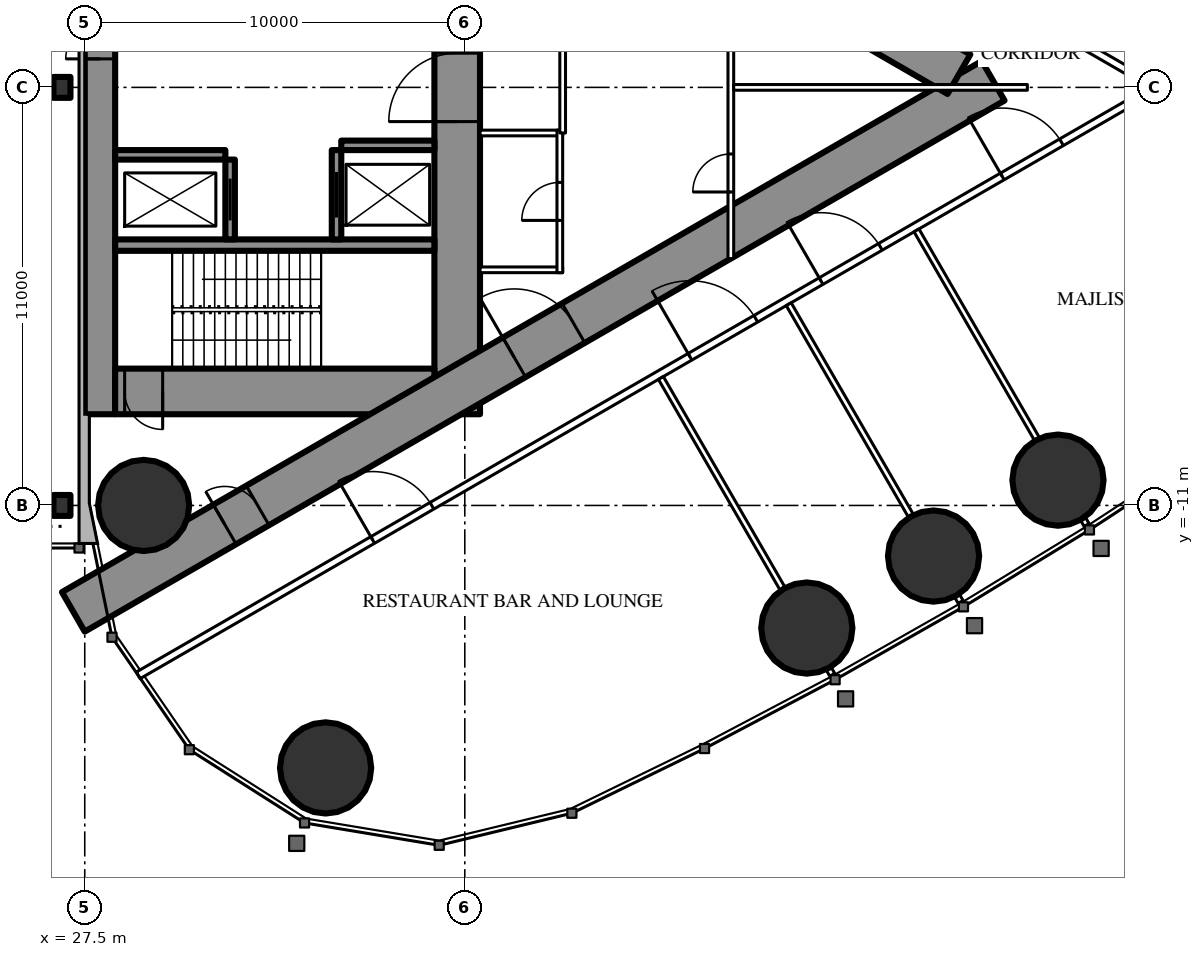
"""IFC4 building model, lengths in metres.
Left out: names, types, materials, properties, quantities, classifications, styles, units other than length and angle.
Written with IfcOpenShell. Run it as: python <this file> out.ifc"""

import sys

from ifc_helpers import new_model, si_unit, direction, frame, frame_2d, origin, origin_2d, place, context, subcontext, project, spatial, rectangle, circle, i_section, extrude, element, fill, save


model = new_model("IFC4")
c1 = context("Model", 3, precision=1e-05, world=origin(), true_north=direction((0.0, 1.0)))
c2 = subcontext(c1, "Body", "Model", "MODEL_VIEW")
j1 = project(units=[si_unit("LENGTHUNIT", "METRE"), si_unit("PLANEANGLEUNIT", "RADIAN")], contexts=[c1])
p1 = place(None, origin())
s1 = spatial("IfcSite", under=j1, at=p1, CompositionType="ELEMENT")
p2 = place(p1, origin())
s2 = spatial("IfcBuilding", under=s1, at=p2, CompositionType="ELEMENT")
p3 = place(p2, frame((0.0, 0.0, 251.9)))
s3 = spatial("IfcBuildingStorey", under=s2, at=p3, CompositionType="ELEMENT", Elevation=251.9)
for number, where, z_axis, x_axis in (
    (1, (33.837, -17.906, 0.0), (0.0, 0.0, 1.0), (1.0, 0.0, 0.0)),
    (2, (29.05, -11.0, 0.0), (0.0, 0.0, 1.0), (1.0, 0.0, 0.0)),
    (3, (46.499, -14.226, 0.0), (0.0, 0.0, 1.0), (1.0, 0.0, 0.0)),
    (4, (49.834, -12.332, 0.0), (0.0, 0.0, 1.0), (1.0, 0.0, 0.0)),
    (5, (53.108, -10.334, 0.0), (0.0, 0.0, 1.0), (1.0, 0.0, 0.0)),
):
    element("IfcColumn", number, at=place(p3, frame(where, z_axis=z_axis, x_axis=x_axis)), inside=s3, PredefinedType="COLUMN", context=c2, shape_type="SweptSolid", body=[
        extrude(circle(Radius=1.2, at=origin_2d()), origin(), (0.0, 0.0, 1.0), 5.4),
    ])
p4 = place(p3, frame((27.9, -8.6, 0.0), z_axis=(0.0, 0.0, 1.0), x_axis=(0.0, 1.0, 0.0)))
e6 = element("IfcWall", 6, at=p4, inside=s3, PredefinedType="SHEAR", context=c2, shape_type="SweptSolid", body=[
    extrude(rectangle(XDim=17.2, YDim=0.8, at=frame_2d((8.6, 0.0))), origin(), (0.0, 0.0, 1.0), 5.4),
])
p5 = place(p4, frame((9.35, 0.0, 0.0)))
e7 = element("IfcOpeningElement", 7, at=p5, cuts=e6, PredefinedType="OPENING", context=c2, shape_type="SweptSolid", body=[
    extrude(rectangle(XDim=0.9, YDim=2.2, at=frame_2d((0.45, 1.1))), frame((0.0, 0.41, 0.0), z_axis=(0.0, -1.0, 0.0), x_axis=(1.0, 0.0, 0.0)), (0.0, 0.0, 1.0), 0.82),
])
p6 = place(p3, frame((37.3, -8.6, 0.0), z_axis=(0.0, 0.0, 1.0), x_axis=(0.0, 1.0, 0.0)))
e8 = element("IfcWall", 8, at=p6, inside=s3, PredefinedType="SHEAR", context=c2, shape_type="SweptSolid", body=[
    extrude(rectangle(XDim=17.2, YDim=1.2, at=frame_2d((8.6, 0.0))), origin(), (0.0, 0.0, 1.0), 5.4),
])
p7 = place(p6, frame((7.7, 0.0, 0.0)))
e9 = element("IfcOpeningElement", 9, at=p7, cuts=e8, PredefinedType="OPENING", context=c2, shape_type="SweptSolid", body=[
    extrude(rectangle(XDim=1.8, YDim=2.2, at=frame_2d((0.9, 1.1))), frame((0.0, 0.61, 0.0), z_axis=(0.0, -1.0, 0.0), x_axis=(1.0, 0.0, 0.0)), (0.0, 0.0, 1.0), 1.22),
])
p8 = place(p3, frame((28.3, -8.0, 0.0), z_axis=(0.0, 0.0, 1.0), x_axis=(1.0, 0.0, 0.0)))
e10 = element("IfcWall", 10, at=p8, inside=s3, PredefinedType="SHEAR", context=c2, shape_type="SweptSolid", body=[
    extrude(rectangle(XDim=8.4, YDim=1.2, at=frame_2d((4.2, 0.0))), origin(), (0.0, 0.0, 1.0), 5.4),
])
p9 = place(p8, frame((0.25, 0.0, 0.0)))
e11 = element("IfcOpeningElement", 11, at=p9, cuts=e10, PredefinedType="OPENING", context=c2, shape_type="SweptSolid", body=[
    extrude(rectangle(XDim=1.0, YDim=2.2, at=frame_2d((0.5, 1.1))), frame((0.0, 0.61, 0.0), z_axis=(0.0, -1.0, 0.0), x_axis=(1.0, 0.0, 0.0)), (0.0, 0.0, 1.0), 1.22),
])
p10 = place(p3, frame((28.3, -4.15, 0.0), z_axis=(0.0, 0.0, 1.0), x_axis=(1.0, 0.0, 0.0)))
e12 = element("IfcWall", 12, at=p10, inside=s3, PredefinedType="SHEAR", context=c2, shape_type="SweptSolid", body=[
    extrude(rectangle(XDim=8.4, YDim=0.3, at=frame_2d((4.2, 0.0))), origin(), (0.0, 0.0, 1.0), 5.4),
])
p11 = place(p3, frame((31.325, -4.0, 0.0), z_axis=(0.0, 0.0, 1.0), x_axis=(0.0, 1.0, 0.0)))
e13 = element("IfcWall", 13, at=p11, inside=s3, PredefinedType="SHEAR", context=c2, shape_type="SweptSolid", body=[
    extrude(rectangle(XDim=2.1, YDim=0.25, at=frame_2d((1.05, 0.0))), origin(), (0.0, 0.0, 1.0), 5.4),
])
p12 = place(p11, frame((0.5, 0.0, 0.0)))
e14 = element("IfcOpeningElement", 14, at=p12, cuts=e13, PredefinedType="OPENING", context=c2, shape_type="SweptSolid", body=[
    extrude(rectangle(XDim=1.1, YDim=2.2, at=frame_2d((0.55, 1.1))), frame((0.0, 0.135, 0.0), z_axis=(0.0, -1.0, 0.0), x_axis=(1.0, 0.0, 0.0)), (0.0, 0.0, 1.0), 0.27),
])
p13 = place(p3, frame((34.125, -4.0, 0.0), z_axis=(0.0, 0.0, 1.0), x_axis=(0.0, 1.0, 0.0)))
e15 = element("IfcWall", 15, at=p13, inside=s3, PredefinedType="SHEAR", context=c2, shape_type="SweptSolid", body=[
    extrude(rectangle(XDim=2.35, YDim=0.25, at=frame_2d((1.175, 0.0))), origin(), (0.0, 0.0, 1.0), 5.4),
])
p14 = place(p13, frame((0.575, 0.0, 0.0)))
e16 = element("IfcOpeningElement", 16, at=p14, cuts=e15, PredefinedType="OPENING", context=c2, shape_type="SweptSolid", body=[
    extrude(rectangle(XDim=1.2, YDim=2.2, at=frame_2d((0.6, 1.1))), frame((0.0, 0.135, 0.0), z_axis=(0.0, -1.0, 0.0), x_axis=(1.0, 0.0, 0.0)), (0.0, 0.0, 1.0), 0.27),
])
p15 = place(p3, frame((28.3, -1.775, 0.0), z_axis=(0.0, 0.0, 1.0), x_axis=(1.0, 0.0, 0.0)))
e17 = element("IfcWall", 17, at=p15, inside=s3, PredefinedType="SHEAR", context=c2, shape_type="SweptSolid", body=[
    extrude(rectangle(XDim=2.9, YDim=0.25, at=frame_2d((1.45, 0.0))), origin(), (0.0, 0.0, 1.0), 5.4),
])
p16 = place(p3, frame((34.25, -1.525, 0.0), z_axis=(0.0, 0.0, 1.0), x_axis=(1.0, 0.0, 0.0)))
e18 = element("IfcWall", 18, at=p16, inside=s3, PredefinedType="SHEAR", context=c2, shape_type="SweptSolid", body=[
    extrude(rectangle(XDim=2.45, YDim=0.25, at=frame_2d((1.225, 0.0))), origin(), (0.0, 0.0, 1.0), 5.4),
])
p17 = place(p3, frame((27.2, -13.8, 0.0), z_axis=(0.0, 0.0, 1.0), x_axis=(0.866027159892, 0.499996958321, 0.0)))
e19 = element("IfcWall", 19, at=p17, inside=s3, PredefinedType="SHEAR", context=c2, shape_type="SweptSolid", body=[
    extrude(rectangle(XDim=27.947, YDim=1.2, at=frame_2d((13.973, 0.0))), origin(), (0.0, 0.0, 1.0), 5.4),
])
p18 = place(p17, frame((4.6, 0.0, 0.0)))
e20 = element("IfcOpeningElement", 20, at=p18, cuts=e19, PredefinedType="OPENING", context=c2, shape_type="SweptSolid", body=[
    extrude(rectangle(XDim=1.0, YDim=2.2, at=frame_2d((0.5, 1.1))), frame((0.0, 0.61, 0.0), z_axis=(0.0, -1.0, 0.0), x_axis=(1.0, 0.0, 0.0)), (0.0, 0.0, 1.0), 1.22),
])
p19 = place(p17, frame((13.395, 0.0, 0.0)))
e21 = element("IfcOpeningElement", 21, at=p19, cuts=e19, PredefinedType="OPENING", context=c2, shape_type="SweptSolid", body=[
    extrude(rectangle(XDim=1.8, YDim=2.2, at=frame_2d((0.9, 1.1))), frame((0.0, 0.61, 0.0), z_axis=(0.0, -1.0, 0.0), x_axis=(1.0, 0.0, 0.0)), (0.0, 0.0, 1.0), 1.22),
])
p20 = place(p3, frame((27.2, 13.8, 0.0), z_axis=(0.0, 0.0, 1.0), x_axis=(0.866024515034, -0.500001539357, 0.0)))
e22 = element("IfcWall", 22, at=p20, inside=s3, PredefinedType="SHEAR", context=c2, shape_type="SweptSolid", body=[
    extrude(rectangle(XDim=26.907, YDim=1.2, at=frame_2d((13.454, 0.0))), origin(), (0.0, 0.0, 1.0), 5.4),
])
p21 = place(p20, frame((4.6, 0.0, 0.0)))
e23 = element("IfcOpeningElement", 23, at=p21, cuts=e22, PredefinedType="OPENING", context=c2, shape_type="SweptSolid", body=[
    extrude(rectangle(XDim=1.0, YDim=2.2, at=frame_2d((0.5, 1.1))), frame((0.0, 0.61, 0.0), z_axis=(0.0, -1.0, 0.0), x_axis=(1.0, 0.0, 0.0)), (0.0, 0.0, 1.0), 1.22),
])
p22 = place(p20, frame((13.395, 0.0, 0.0)))
e24 = element("IfcOpeningElement", 24, at=p22, cuts=e22, PredefinedType="OPENING", context=c2, shape_type="SweptSolid", body=[
    extrude(rectangle(XDim=1.8, YDim=2.2, at=frame_2d((0.9, 1.1))), frame((0.0, 0.61, 0.0), z_axis=(0.0, -1.0, 0.0), x_axis=(1.0, 0.0, 0.0)), (0.0, 0.0, 1.0), 1.22),
])
for number, where, z_axis, x_axis in (
    (25, (26.9, -11.0, 0.0), (0.0, 0.0, 1.0), (1.0, 0.0, 0.0)),
    (26, (26.9, 0.0, 0.0), (0.0, 0.0, 1.0), (1.0, 0.0, 0.0)),
):
    element("IfcColumn", number, at=place(p3, frame(where, z_axis=z_axis, x_axis=x_axis)), inside=s3, PredefinedType="COLUMN", context=c2, shape_type="SweptSolid", body=[
        extrude(i_section(OverallWidth=0.448, OverallDepth=0.55, WebThickness=0.072, FlangeThickness=0.115, FilletRadius=0.02, at=origin_2d()), origin(), (0.0, 0.0, 1.0), 5.4),
    ])
p23 = place(p3, frame((28.907, -15.47, 0.0), z_axis=(0.0, 0.0, 1.0), x_axis=(0.866023700353, 0.500002950419, 0.0)))
e27 = element("IfcWall", 27, at=p23, inside=s3, PredefinedType="PARTITIONING", context=c2, shape_type="SweptSolid", body=[
    extrude(rectangle(XDim=30.941, YDim=0.2, at=frame_2d((15.47, 0.0))), origin(), (0.0, 0.0, 1.0), 5.15),
])
p24 = place(p23, frame((7.124, 0.0, 0.0)))
e28 = element("IfcOpeningElement", 28, at=p24, cuts=e27, PredefinedType="OPENING", context=c2, shape_type="SweptSolid", body=[
    extrude(rectangle(XDim=1.8, YDim=2.2, at=frame_2d((0.9, 1.1))), frame((0.0, 0.11, 0.0), z_axis=(0.0, -1.0, 0.0), x_axis=(1.0, 0.0, 0.0)), (0.0, 0.0, 1.0), 0.22),
])
p25 = place(p23, frame((16.765, 0.0, 0.0)))
e29 = element("IfcOpeningElement", 29, at=p25, cuts=e27, PredefinedType="OPENING", context=c2, shape_type="SweptSolid", body=[
    extrude(rectangle(XDim=2.0, YDim=2.4, at=frame_2d((1.0, 1.2))), frame((0.0, 0.11, 0.0), z_axis=(0.0, -1.0, 0.0), x_axis=(1.0, 0.0, 0.0)), (0.0, 0.0, 1.0), 0.22),
])
p26 = place(p23, frame((20.748, 0.0, 0.0)))
e30 = element("IfcOpeningElement", 30, at=p26, cuts=e27, PredefinedType="OPENING", context=c2, shape_type="SweptSolid", body=[
    extrude(rectangle(XDim=1.8, YDim=2.2, at=frame_2d((0.9, 1.1))), frame((0.0, 0.11, 0.0), z_axis=(0.0, -1.0, 0.0), x_axis=(1.0, 0.0, 0.0)), (0.0, 0.0, 1.0), 0.22),
])
p27 = place(p23, frame((26.252, 0.0, 0.0)))
e31 = element("IfcOpeningElement", 31, at=p27, cuts=e27, PredefinedType="OPENING", context=c2, shape_type="SweptSolid", body=[
    extrude(rectangle(XDim=1.8, YDim=2.2, at=frame_2d((0.9, 1.1))), frame((0.0, 0.11, 0.0), z_axis=(0.0, -1.0, 0.0), x_axis=(1.0, 0.0, 0.0)), (0.0, 0.0, 1.0), 0.22),
])
p28 = place(p3, frame((42.66, -7.646, 0.0), z_axis=(0.0, 0.0, 1.0), x_axis=(0.499996592859, -0.866027370889, 0.0)))
e32 = element("IfcWall", 32, at=p28, inside=s3, PredefinedType="PARTITIONING", context=c2, shape_type="SweptSolid", body=[
    extrude(rectangle(XDim=6.398, YDim=0.15, at=frame_2d((3.199, 0.0))), origin(), (0.0, 0.0, 1.0), 4.25),
])
p29 = place(p3, frame((47.079, -15.3, 0.0), z_axis=(0.0, 0.0, 1.0), x_axis=(0.499212083968, -0.866479829667, 0.0)))
e33 = element("IfcWall", 33, at=p29, inside=s3, PredefinedType="PARTITIONING", context=c2, shape_type="SweptSolid", body=[
    extrude(rectangle(XDim=0.179, YDim=0.15, at=frame_2d((0.09, 0.0))), origin(), (0.0, 0.0, 1.0), 4.25),
])
p30 = place(p3, frame((46.023, -5.704, 0.0), z_axis=(0.0, 0.0, 1.0), x_axis=(0.499984478165, -0.866034365135, 0.0)))
e34 = element("IfcWall", 34, at=p30, inside=s3, PredefinedType="PARTITIONING", context=c2, shape_type="SweptSolid", body=[
    extrude(rectangle(XDim=6.426, YDim=0.15, at=frame_2d((3.213, 0.0))), origin(), (0.0, 0.0, 1.0), 4.25),
])
p31 = place(p3, frame((50.456, -13.382, 0.0), z_axis=(0.0, 0.0, 1.0), x_axis=(0.500661834965, -0.865642955848, 0.0)))
e35 = element("IfcWall", 35, at=p31, inside=s3, PredefinedType="PARTITIONING", context=c2, shape_type="SweptSolid", body=[
    extrude(rectangle(XDim=0.18, YDim=0.15, at=frame_2d((0.09, 0.0))), origin(), (0.0, 0.0, 1.0), 4.25),
])
p32 = place(p3, frame((49.385, -3.763, 0.0), z_axis=(0.0, 0.0, 1.0), x_axis=(0.499999447814, -0.866025722589, 0.0)))
e36 = element("IfcWall", 36, at=p32, inside=s3, PredefinedType="PARTITIONING", context=c2, shape_type="SweptSolid", body=[
    extrude(rectangle(XDim=6.333, YDim=0.15, at=frame_2d((3.166, 0.0))), origin(), (0.0, 0.0, 1.0), 4.25),
])
p33 = place(p3, frame((53.771, -11.36, 0.0), z_axis=(0.0, 0.0, 1.0), x_axis=(0.499524978789, -0.866299483762, 0.0)))
e37 = element("IfcWall", 37, at=p33, inside=s3, PredefinedType="PARTITIONING", context=c2, shape_type="SweptSolid", body=[
    extrude(rectangle(XDim=0.178, YDim=0.15, at=frame_2d((0.089, 0.0))), origin(), (0.0, 0.0, 1.0), 4.25),
])
p34 = place(p3, frame((52.639, 1.769, 0.0), z_axis=(0.0, 0.0, 1.0), x_axis=(0.866027340901, -0.4999966448, 0.0)))
e38 = element("IfcWall", 38, at=p34, inside=s3, PredefinedType="PARTITIONING", context=c2, shape_type="SweptSolid", body=[
    extrude(rectangle(XDim=3.417, YDim=0.2, at=frame_2d((1.708, 0.0))), origin(), (0.0, 0.0, 1.0), 5.15),
])
p35 = place(p34, frame((0.708, 0.0, 0.0)))
e39 = element("IfcOpeningElement", 39, at=p35, cuts=e38, PredefinedType="OPENING", context=c2, shape_type="SweptSolid", body=[
    extrude(rectangle(XDim=2.0, YDim=2.4, at=frame_2d((1.0, 1.2))), frame((0.0, 0.11, 0.0), z_axis=(0.0, -1.0, 0.0), x_axis=(1.0, 0.0, 0.0)), (0.0, 0.0, 1.0), 0.22),
])
for number, where, z_axis, x_axis in (
    (40, (37.9, -1.2, 0.0), (0.0, 0.0, 1.0), (1.0, 0.0, 0.0)),
    (41, (37.9, -4.8, 0.0), (0.0, 0.0, 1.0), (1.0, 0.0, 0.0)),
):
    element("IfcWall", number, at=place(p3, frame(where, z_axis=z_axis, x_axis=x_axis)), inside=s3, PredefinedType="PARTITIONING", context=c2, shape_type="SweptSolid", body=[
        extrude(rectangle(XDim=2.175, YDim=0.15, at=frame_2d((1.087, 0.0))), origin(), (0.0, 0.0, 1.0), 5.15),
    ])
p36 = place(p3, frame((40.0, -4.875, 0.0), z_axis=(0.0, 0.0, 1.0), x_axis=(0.0, 1.0, 0.0)))
e42 = element("IfcWall", 42, at=p36, inside=s3, PredefinedType="PARTITIONING", context=c2, shape_type="SweptSolid", body=[
    extrude(rectangle(XDim=3.75, YDim=0.15, at=frame_2d((1.875, 0.0))), origin(), (0.0, 0.0, 1.0), 5.15),
])
p37 = place(p36, frame((1.375, 0.0, 0.0)))
e43 = element("IfcOpeningElement", 43, at=p37, cuts=e42, PredefinedType="OPENING", context=c2, shape_type="SweptSolid", body=[
    extrude(rectangle(XDim=1.0, YDim=2.2, at=frame_2d((0.5, 1.1))), frame((0.0, 0.085, 0.0), z_axis=(0.0, -1.0, 0.0), x_axis=(1.0, 0.0, 0.0)), (0.0, 0.0, 1.0), 0.17),
])
p38 = place(p3, frame((40.075, -1.2, 0.0), z_axis=(0.0, 0.0, 1.0), x_axis=(0.0, 1.0, 0.0)))
e44 = element("IfcWall", 44, at=p38, inside=s3, PredefinedType="PARTITIONING", context=c2, shape_type="SweptSolid", body=[
    extrude(rectangle(XDim=6.874, YDim=0.15, at=frame_2d((3.437, 0.0))), origin(), (0.0, 0.0, 1.0), 5.15),
])
p39 = place(p38, frame((2.537, 0.0, 0.0)))
e45 = element("IfcOpeningElement", 45, at=p39, cuts=e44, PredefinedType="OPENING", context=c2, shape_type="SweptSolid", body=[
    extrude(rectangle(XDim=1.8, YDim=2.2, at=frame_2d((0.9, 1.1))), frame((0.0, 0.085, 0.0), z_axis=(0.0, -1.0, 0.0), x_axis=(1.0, 0.0, 0.0)), (0.0, 0.0, 1.0), 0.17),
])
p40 = place(p3, frame((44.5, -4.505, 0.0), z_axis=(0.0, 0.0, 1.0), x_axis=(0.0, 1.0, 0.0)))
e46 = element("IfcWall", 46, at=p40, inside=s3, PredefinedType="PARTITIONING", context=c2, shape_type="SweptSolid", body=[
    extrude(rectangle(XDim=9.009, YDim=0.15, at=frame_2d((4.505, 0.0))), origin(), (0.0, 0.0, 1.0), 5.15),
])
p41 = place(p40, frame((1.752, 0.0, 0.0)))
e47 = element("IfcOpeningElement", 47, at=p41, cuts=e46, PredefinedType="OPENING", context=c2, shape_type="SweptSolid", body=[
    extrude(rectangle(XDim=1.0, YDim=2.2, at=frame_2d((0.5, 1.1))), frame((0.0, 0.085, 0.0), z_axis=(0.0, -1.0, 0.0), x_axis=(1.0, 0.0, 0.0)), (0.0, 0.0, 1.0), 0.17),
])
p42 = place(p40, frame((6.257, 0.0, 0.0)))
e48 = element("IfcOpeningElement", 48, at=p42, cuts=e46, PredefinedType="OPENING", context=c2, shape_type="SweptSolid", body=[
    extrude(rectangle(XDim=1.0, YDim=2.2, at=frame_2d((0.5, 1.1))), frame((0.0, 0.085, 0.0), z_axis=(0.0, -1.0, 0.0), x_axis=(1.0, 0.0, 0.0)), (0.0, 0.0, 1.0), 0.17),
])
p43 = place(p3, frame((44.575, 0.0, 0.0), z_axis=(0.0, 0.0, 1.0), x_axis=(1.0, 0.0, 0.0)))
e49 = element("IfcWall", 49, at=p43, inside=s3, PredefinedType="PARTITIONING", context=c2, shape_type="SweptSolid", body=[
    extrude(rectangle(XDim=7.727, YDim=0.15, at=frame_2d((3.864, 0.0))), origin(), (0.0, 0.0, 1.0), 4.25),
])
p44 = place(p24, origin())
e50 = element("IfcDoor", 50, at=p44, inside=s3, OperationType="DOUBLE_DOOR_SINGLE_SWING", PredefinedType="DOOR", context=c2, shape_type="SweptSolid", body=[
    extrude(rectangle(XDim=1.8, YDim=2.2, at=frame_2d((0.9, 1.1))), frame((0.0, 0.025, 0.0), z_axis=(0.0, -1.0, 0.0), x_axis=(1.0, 0.0, 0.0)), (0.0, 0.0, 1.0), 0.05),
])
fill(e28, e50)
p45 = place(p25, origin())
e51 = element("IfcDoor", 51, at=p45, inside=s3, OperationType="DOUBLE_DOOR_SINGLE_SWING", PredefinedType="DOOR", context=c2, shape_type="SweptSolid", body=[
    extrude(rectangle(XDim=2.0, YDim=2.4, at=frame_2d((1.0, 1.2))), frame((0.0, 0.025, 0.0), z_axis=(0.0, -1.0, 0.0), x_axis=(1.0, 0.0, 0.0)), (0.0, 0.0, 1.0), 0.05),
])
fill(e29, e51)
p46 = place(p26, origin())
e52 = element("IfcDoor", 52, at=p46, inside=s3, OperationType="DOUBLE_DOOR_SINGLE_SWING", PredefinedType="DOOR", context=c2, shape_type="SweptSolid", body=[
    extrude(rectangle(XDim=1.8, YDim=2.2, at=frame_2d((0.9, 1.1))), frame((0.0, 0.025, 0.0), z_axis=(0.0, -1.0, 0.0), x_axis=(1.0, 0.0, 0.0)), (0.0, 0.0, 1.0), 0.05),
])
fill(e30, e52)
p47 = place(p27, origin())
e53 = element("IfcDoor", 53, at=p47, inside=s3, OperationType="DOUBLE_DOOR_SINGLE_SWING", PredefinedType="DOOR", context=c2, shape_type="SweptSolid", body=[
    extrude(rectangle(XDim=1.8, YDim=2.2, at=frame_2d((0.9, 1.1))), frame((0.0, 0.025, 0.0), z_axis=(0.0, -1.0, 0.0), x_axis=(1.0, 0.0, 0.0)), (0.0, 0.0, 1.0), 0.05),
])
fill(e31, e53)
p48 = place(p35, origin())
e54 = element("IfcDoor", 54, at=p48, inside=s3, OperationType="DOUBLE_DOOR_SINGLE_SWING", PredefinedType="DOOR", context=c2, shape_type="SweptSolid", body=[
    extrude(rectangle(XDim=2.0, YDim=2.4, at=frame_2d((1.0, 1.2))), frame((0.0, 0.025, 0.0), z_axis=(0.0, -1.0, 0.0), x_axis=(1.0, 0.0, 0.0)), (0.0, 0.0, 1.0), 0.05),
])
fill(e39, e54)
p49 = place(p37, origin())
e55 = element("IfcDoor", 55, at=p49, inside=s3, OperationType="SINGLE_SWING_LEFT", PredefinedType="DOOR", context=c2, shape_type="SweptSolid", body=[
    extrude(rectangle(XDim=1.0, YDim=2.2, at=frame_2d((0.5, 1.1))), frame((0.0, 0.025, 0.0), z_axis=(0.0, -1.0, 0.0), x_axis=(1.0, 0.0, 0.0)), (0.0, 0.0, 1.0), 0.05),
])
fill(e43, e55)
p50 = place(p41, origin())
e56 = element("IfcDoor", 56, at=p50, inside=s3, OperationType="SINGLE_SWING_LEFT", PredefinedType="DOOR", context=c2, shape_type="SweptSolid", body=[
    extrude(rectangle(XDim=1.0, YDim=2.2, at=frame_2d((0.5, 1.1))), frame((0.0, 0.025, 0.0), z_axis=(0.0, -1.0, 0.0), x_axis=(1.0, 0.0, 0.0)), (0.0, 0.0, 1.0), 0.05),
])
fill(e47, e56)
p51 = place(p18, origin())
e57 = element("IfcDoor", 57, at=p51, inside=s3, OperationType="SINGLE_SWING_LEFT", PredefinedType="DOOR", context=c2, shape_type="SweptSolid", body=[
    extrude(rectangle(XDim=1.0, YDim=2.2, at=frame_2d((0.5, 1.1))), frame((0.0, 0.025, 0.0), z_axis=(0.0, -1.0, 0.0), x_axis=(1.0, 0.0, 0.0)), (0.0, 0.0, 1.0), 0.05),
])
fill(e20, e57)
p52 = place(p19, origin())
e58 = element("IfcDoor", 58, at=p52, inside=s3, OperationType="DOUBLE_DOOR_SINGLE_SWING", PredefinedType="DOOR", context=c2, shape_type="SweptSolid", body=[
    extrude(rectangle(XDim=1.8, YDim=2.2, at=frame_2d((0.9, 1.1))), frame((0.0, 0.025, 0.0), z_axis=(0.0, -1.0, 0.0), x_axis=(1.0, 0.0, 0.0)), (0.0, 0.0, 1.0), 0.05),
])
fill(e21, e58)
p53 = place(p7, origin())
e59 = element("IfcDoor", 59, at=p53, inside=s3, OperationType="DOUBLE_DOOR_SINGLE_SWING", PredefinedType="DOOR", context=c2, shape_type="SweptSolid", body=[
    extrude(rectangle(XDim=1.8, YDim=2.2, at=frame_2d((0.9, 1.1))), frame((0.0, 0.025, 0.0), z_axis=(0.0, -1.0, 0.0), x_axis=(1.0, 0.0, 0.0)), (0.0, 0.0, 1.0), 0.05),
])
fill(e9, e59)
p54 = place(p9, origin())
e60 = element("IfcDoor", 60, at=p54, inside=s3, OperationType="SINGLE_SWING_RIGHT", PredefinedType="DOOR", context=c2, shape_type="SweptSolid", body=[
    extrude(rectangle(XDim=1.0, YDim=2.2, at=frame_2d((0.5, 1.1))), frame((0.0, 0.025, 0.0), z_axis=(0.0, -1.0, 0.0), x_axis=(1.0, 0.0, 0.0)), (0.0, 0.0, 1.0), 0.05),
])
fill(e11, e60)
p55 = place(p5, origin())
e61 = element("IfcDoor", 61, at=p55, inside=s3, OperationType="SINGLE_SWING_LEFT", PredefinedType="DOOR", context=c2, shape_type="SweptSolid", body=[
    extrude(rectangle(XDim=0.9, YDim=2.2, at=frame_2d((0.45, 1.1))), frame((0.0, 0.025, 0.0), z_axis=(0.0, -1.0, 0.0), x_axis=(1.0, 0.0, 0.0)), (0.0, 0.0, 1.0), 0.05),
])
fill(e7, e61)
p56 = place(p12, origin())
e62 = element("IfcDoor", 62, at=p56, inside=s3, OperationType="SLIDING_TO_LEFT", PredefinedType="USERDEFINED", context=c2, shape_type="SweptSolid", body=[
    extrude(rectangle(XDim=1.1, YDim=2.2, at=frame_2d((0.55, 1.1))), frame((0.0, 0.025, 0.0), z_axis=(0.0, -1.0, 0.0), x_axis=(1.0, 0.0, 0.0)), (0.0, 0.0, 1.0), 0.05),
])
fill(e14, e62)
p57 = place(p14, origin())
e63 = element("IfcDoor", 63, at=p57, inside=s3, OperationType="DOUBLE_DOOR_SLIDING", PredefinedType="USERDEFINED", context=c2, shape_type="SweptSolid", body=[
    extrude(rectangle(XDim=1.2, YDim=2.2, at=frame_2d((0.6, 1.1))), frame((0.0, 0.025, 0.0), z_axis=(0.0, -1.0, 0.0), x_axis=(1.0, 0.0, 0.0)), (0.0, 0.0, 1.0), 0.05),
])
fill(e16, e63)
save(model, sys.argv[1])
